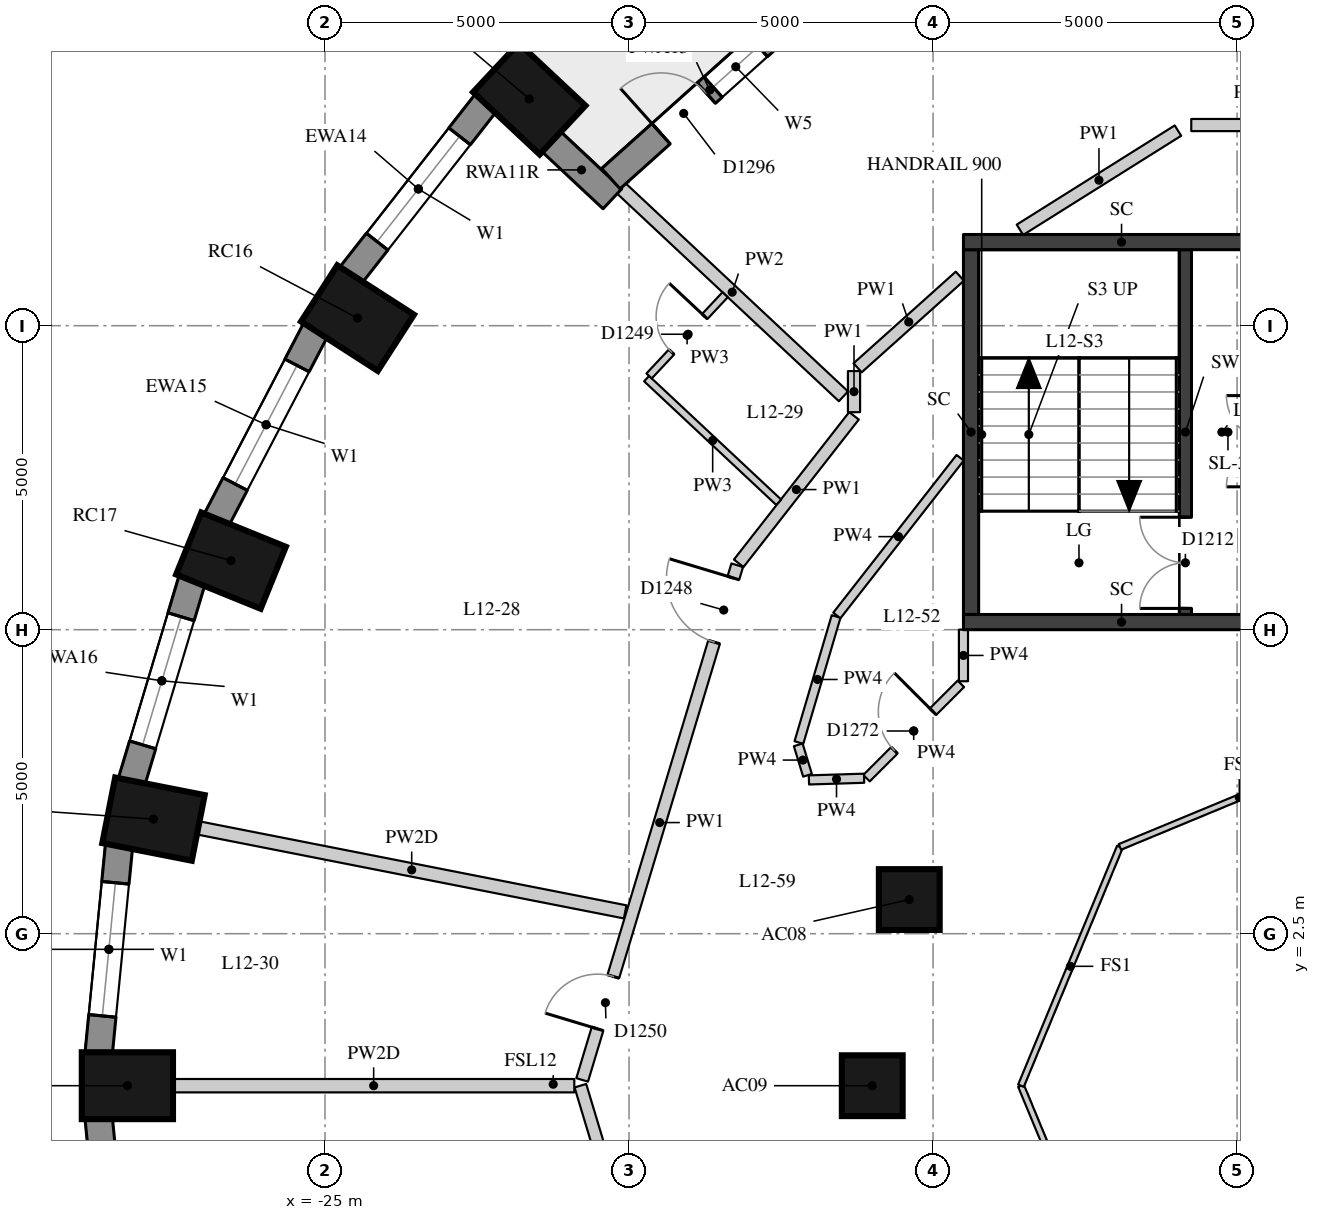
"""IFC4 building model, lengths in metres.
Left out: names, types, materials, properties, quantities, classifications, styles, units other than length and angle.
Written with IfcOpenShell. Run it as: python <this file> out.ifc"""

import sys

from ifc_helpers import new_model, si_unit, direction, frame, frame_2d, origin, origin_2d, place, context, subcontext, project, spatial, rectangle, extrude, element, fill, save


model = new_model("IFC4")
c1 = context("Model", 3, precision=1e-05, world=origin(), true_north=direction((0.0, 1.0)))
c2 = subcontext(c1, "Body", "Model", "MODEL_VIEW")
j1 = project(units=[si_unit("LENGTHUNIT", "METRE"), si_unit("PLANEANGLEUNIT", "RADIAN")], contexts=[c1])
p1 = place(None, origin())
s1 = spatial("IfcSite", under=j1, at=p1, CompositionType="ELEMENT")
p2 = place(p1, origin())
s2 = spatial("IfcBuilding", under=s1, at=p2, CompositionType="ELEMENT")
p3 = place(p2, frame((0.0, 0.0, 48.1)))
s3 = spatial("IfcBuildingStorey", under=s2, at=p3, CompositionType="ELEMENT", Elevation=48.1)
for number, where, z_axis, x_axis in (
    (1, (-21.641, 16.23, 0.0), (0.0, 0.0, 1.0), (-0.73, 0.683, 0.0)),
    (2, (-24.465, 12.625, 0.0), (0.0, 0.0, 1.0), (-0.841, 0.541, 0.0)),
    (3, (-26.546, 8.636, 0.0), (0.0, 0.0, 1.0), (-0.927, 0.376, 0.0)),
    (4, (-27.821, 4.385, 0.0), (0.0, 0.0, 1.0), (-0.981, 0.193, 0.0)),
    (5, (-28.25, 0.0, 0.0), (0.0, 0.0, 1.0), (-1.0, 0.0, 0.0)),
):
    element("IfcColumn", number, at=place(p3, frame(where, z_axis=z_axis, x_axis=x_axis)), inside=s3, PredefinedType="COLUMN", context=c2, shape_type="SweptSolid", body=[
        extrude(rectangle(XDim=1.5, YDim=1.1, at=origin_2d()), origin(), (0.0, 0.0, 1.0), 3.3),
    ])
for number, where, z_axis, x_axis in (
    (6, (-15.391, 3.062, 0.0), (0.0, 0.0, 1.0), (1.0, 0.0, 0.0)),
    (7, (-16.0, 0.0, 0.0), (0.0, 0.0, 1.0), (1.0, 0.0, 0.0)),
):
    element("IfcColumn", number, at=place(p3, frame(where, z_axis=z_axis, x_axis=x_axis)), inside=s3, PredefinedType="COLUMN", context=c2, shape_type="SweptSolid", body=[
        extrude(rectangle(XDim=1.0, YDim=1.0, at=origin_2d()), origin(), (0.0, 0.0, 1.0), 3.3),
    ])
p4 = place(p3, frame((-22.352, 16.17, 0.0), z_axis=(0.0, 0.0, 1.0), x_axis=(-0.616661975264, -0.787228053529, 0.0)))
e8 = element("IfcWall", 8, at=p4, inside=s3, PredefinedType="SOLIDWALL", context=c2, shape_type="SweptSolid", body=[
    extrude(rectangle(XDim=3.61, YDim=0.45, at=frame_2d((1.805, 0.0))), origin(), (0.0, 0.0, 1.0), 3.02),
])
p5 = place(p4, frame((0.705, 0.0, 0.4)))
e9 = element("IfcOpeningElement", 9, at=p5, cuts=e8, PredefinedType="OPENING", context=c2, shape_type="SweptSolid", body=[
    extrude(rectangle(XDim=2.2, YDim=1.75, at=frame_2d((1.1, 0.875))), frame((0.0, 0.235, 0.0), z_axis=(0.0, -1.0, 0.0), x_axis=(1.0, 0.0, 0.0)), (0.0, 0.0, 1.0), 0.47),
])
p6 = place(p3, frame((-25.152, 12.437, 0.0), z_axis=(0.0, 0.0, 1.0), x_axis=(-0.462492775226, -0.886623050041, 0.0)))
e10 = element("IfcWall", 10, at=p6, inside=s3, PredefinedType="SOLIDWALL", context=c2, shape_type="SweptSolid", body=[
    extrude(rectangle(XDim=3.532, YDim=0.45, at=frame_2d((1.766, 0.0))), origin(), (0.0, 0.0, 1.0), 3.02),
])
p7 = place(p6, frame((0.666, 0.0, 0.4)))
e11 = element("IfcOpeningElement", 11, at=p7, cuts=e10, PredefinedType="OPENING", context=c2, shape_type="SweptSolid", body=[
    extrude(rectangle(XDim=2.2, YDim=1.75, at=frame_2d((1.1, 0.875))), frame((0.0, 0.235, 0.0), z_axis=(0.0, -1.0, 0.0), x_axis=(1.0, 0.0, 0.0)), (0.0, 0.0, 1.0), 0.47),
])
p8 = place(p3, frame((-27.185, 8.323, 0.0), z_axis=(0.0, 0.0, 1.0), x_axis=(-0.287064133733, -0.957911364963, 0.0)))
e12 = element("IfcWall", 12, at=p8, inside=s3, PredefinedType="SOLIDWALL", context=c2, shape_type="SweptSolid", body=[
    extrude(rectangle(XDim=3.473, YDim=0.45, at=frame_2d((1.737, 0.0))), origin(), (0.0, 0.0, 1.0), 3.02),
])
p9 = place(p8, frame((0.637, 0.0, 0.4)))
e13 = element("IfcOpeningElement", 13, at=p9, cuts=e12, PredefinedType="OPENING", context=c2, shape_type="SweptSolid", body=[
    extrude(rectangle(XDim=2.2, YDim=1.75, at=frame_2d((1.1, 0.875))), frame((0.0, 0.235, 0.0), z_axis=(0.0, -1.0, 0.0), x_axis=(1.0, 0.0, 0.0)), (0.0, 0.0, 1.0), 0.47),
])
p10 = place(p3, frame((-28.387, 3.956, 0.0), z_axis=(0.0, 0.0, 1.0), x_axis=(-0.097389581596, -0.995246336038, 0.0)))
e14 = element("IfcWall", 14, at=p10, inside=s3, PredefinedType="SOLIDWALL", context=c2, shape_type="SweptSolid", body=[
    extrude(rectangle(XDim=3.442, YDim=0.45, at=frame_2d((1.721, 0.0))), origin(), (0.0, 0.0, 1.0), 3.02),
])
p11 = place(p10, frame((0.621, 0.0, 0.4)))
e15 = element("IfcOpeningElement", 15, at=p11, cuts=e14, PredefinedType="OPENING", context=c2, shape_type="SweptSolid", body=[
    extrude(rectangle(XDim=2.2, YDim=1.75, at=frame_2d((1.1, 0.875))), frame((0.0, 0.235, 0.0), z_axis=(0.0, -1.0, 0.0), x_axis=(1.0, 0.0, 0.0)), (0.0, 0.0, 1.0), 0.47),
])
p12 = place(p3, frame((-28.722, -0.53, 0.0), z_axis=(0.0, 0.0, 1.0), x_axis=(0.097389581596, -0.995246336038, 0.0)))
e16 = element("IfcWall", 16, at=p12, inside=s3, PredefinedType="SOLIDWALL", context=c2, shape_type="SweptSolid", body=[
    extrude(rectangle(XDim=3.442, YDim=0.45, at=frame_2d((1.721, 0.0))), origin(), (0.0, 0.0, 1.0), 3.02),
])
p13 = place(p12, frame((0.621, 0.0, 0.4)))
e17 = element("IfcOpeningElement", 17, at=p13, cuts=e16, PredefinedType="OPENING", context=c2, shape_type="SweptSolid", body=[
    extrude(rectangle(XDim=2.2, YDim=1.75, at=frame_2d((1.1, 0.875))), frame((0.0, 0.235, 0.0), z_axis=(0.0, -1.0, 0.0), x_axis=(1.0, 0.0, 0.0)), (0.0, 0.0, 1.0), 0.47),
])
p14 = place(p3, frame((-21.289, 15.538, 0.0), z_axis=(0.0, 0.0, 1.0), x_axis=(0.730149942784, -0.683286953668, 0.0)))
e18 = element("IfcWall", 18, at=p14, inside=s3, PredefinedType="SOLIDWALL", context=c2, shape_type="SweptSolid", body=[
    extrude(rectangle(XDim=1.391, YDim=0.45, at=frame_2d((0.695, 0.0))), origin(), (0.0, 0.0, 1.0), 3.02),
])
p15 = place(p3, frame((-17.048, 17.832, 0.0), z_axis=(0.0, 0.0, 1.0), x_axis=(-0.744619286768, -0.667489413978, 0.0)))
e19 = element("IfcWall", 19, at=p15, inside=s3, PredefinedType="SOLIDWALL", context=c2, shape_type="SweptSolid", body=[
    extrude(rectangle(XDim=4.365, YDim=0.45, at=frame_2d((2.183, 0.0))), origin(), (0.0, 0.0, 1.0), 3.02),
])
p16 = place(p15, frame((1.107, 0.0, 0.4)))
e20 = element("IfcOpeningElement", 20, at=p16, cuts=e19, PredefinedType="OPENING", context=c2, shape_type="SweptSolid", body=[
    extrude(rectangle(XDim=1.0, YDim=1.75, at=frame_2d((0.5, 0.875))), frame((0.0, 0.235, 0.0), z_axis=(0.0, -1.0, 0.0), x_axis=(1.0, 0.0, 0.0)), (0.0, 0.0, 1.0), 0.47),
])
p17 = place(p15, frame((2.258, 0.0, 0.0)))
e21 = element("IfcOpeningElement", 21, at=p17, cuts=e19, PredefinedType="OPENING", context=c2, shape_type="SweptSolid", body=[
    extrude(rectangle(XDim=1.0, YDim=2.15, at=frame_2d((0.5, 1.075))), frame((0.0, 0.235, 0.0), z_axis=(0.0, -1.0, 0.0), x_axis=(1.0, 0.0, 0.0)), (0.0, 0.0, 1.0), 0.47),
])
p18 = place(p3, frame((-10.85, 7.75, 0.0), z_axis=(0.0, 0.0, 1.0), x_axis=(0.0, 1.0, 0.0)))
e22 = element("IfcWall", 22, at=p18, inside=s3, PredefinedType="SHEAR", context=c2, shape_type="SweptSolid", body=[
    extrude(rectangle(XDim=6.0, YDim=0.2, at=frame_2d((3.0, 0.0))), origin(), (0.0, 0.0, 1.0), 3.02),
])
p19 = place(p18, frame((0.1, 0.0, 0.0)))
e23 = element("IfcOpeningElement", 23, at=p19, cuts=e22, PredefinedType="OPENING", context=c2, shape_type="SweptSolid", body=[
    extrude(rectangle(XDim=1.5, YDim=2.1, at=frame_2d((0.75, 1.05))), frame((0.0, 0.11, 0.0), z_axis=(0.0, -1.0, 0.0), x_axis=(1.0, 0.0, 0.0)), (0.0, 0.0, 1.0), 0.22),
])
p20 = place(p3, frame((-14.375, 7.75, -0.28), z_axis=(0.0, 0.0, 1.0), x_axis=(0.0, 1.0, 0.0)))
e24 = element("IfcWall", 24, at=p20, inside=s3, PredefinedType="SHEAR", context=c2, shape_type="SweptSolid", body=[
    extrude(rectangle(XDim=6.0, YDim=0.25, at=frame_2d((3.0, 0.0))), origin(), (0.0, 0.0, 1.0), 3.3),
])
for number, where, z_axis, x_axis in (
    (25, (-14.5, 13.875, -0.28), (0.0, 0.0, 1.0), (1.0, 0.0, 0.0)),
    (26, (-14.5, 7.625, -0.28), (0.0, 0.0, 1.0), (1.0, 0.0, 0.0)),
):
    element("IfcWall", number, at=place(p3, frame(where, z_axis=z_axis, x_axis=x_axis)), inside=s3, PredefinedType="SHEAR", context=c2, shape_type="SweptSolid", body=[
        extrude(rectangle(XDim=5.2, YDim=0.25, at=frame_2d((2.6, 0.0))), origin(), (0.0, 0.0, 1.0), 3.3),
    ])
p21 = place(p3, frame((-18.232, -8.522, 0.0), z_axis=(0.0, 0.0, 1.0), x_axis=(-0.288502732396, 0.957479072043, 0.0)))
e27 = element("IfcWall", 27, at=p21, inside=s3, PredefinedType="PARTITIONING", context=c2, shape_type="SweptSolid", body=[
    extrude(rectangle(XDim=8.901, YDim=0.2, at=frame_2d((4.45, 0.0))), origin(), (0.0, 0.0, 1.0), 3.02),
])
p22 = place(p21, frame((6.965, 0.0, 0.0)))
e28 = element("IfcOpeningElement", 28, at=p22, cuts=e27, PredefinedType="OPENING", context=c2, shape_type="SweptSolid", body=[
    extrude(rectangle(XDim=0.9, YDim=2.1, at=frame_2d((0.45, 1.05))), frame((0.0, 0.11, 0.0), z_axis=(0.0, -1.0, 0.0), x_axis=(1.0, 0.0, 0.0)), (0.0, 0.0, 1.0), 0.22),
])
p23 = place(p21, frame((2.465, 0.0, 0.0)))
e29 = element("IfcOpeningElement", 29, at=p23, cuts=e27, PredefinedType="OPENING", context=c2, shape_type="SweptSolid", body=[
    extrude(rectangle(XDim=1.1, YDim=2.1, at=frame_2d((0.55, 1.05))), frame((0.0, 0.11, 0.0), z_axis=(0.0, -1.0, 0.0), x_axis=(1.0, 0.0, 0.0)), (0.0, 0.0, 1.0), 0.22),
])
p24 = place(p3, frame((-20.771, 0.095, 0.0), z_axis=(0.0, 0.0, 1.0), x_axis=(0.288464952331, 0.957490454927, 0.0)))
e30 = element("IfcWall", 30, at=p24, inside=s3, PredefinedType="PARTITIONING", context=c2, shape_type="SweptSolid", body=[
    extrude(rectangle(XDim=8.841, YDim=0.2, at=frame_2d((4.42, 0.0))), origin(), (0.0, 0.0, 1.0), 3.02),
])
p25 = place(p24, frame((7.521, 0.0, 0.0)))
e31 = element("IfcOpeningElement", 31, at=p25, cuts=e30, PredefinedType="OPENING", context=c2, shape_type="SweptSolid", body=[
    extrude(rectangle(XDim=1.1, YDim=2.1, at=frame_2d((0.55, 1.05))), frame((0.0, 0.11, 0.0), z_axis=(0.0, -1.0, 0.0), x_axis=(1.0, 0.0, 0.0)), (0.0, 0.0, 1.0), 0.22),
])
p26 = place(p24, frame((0.877, 0.0, 0.0)))
e32 = element("IfcOpeningElement", 32, at=p26, cuts=e30, PredefinedType="OPENING", context=c2, shape_type="SweptSolid", body=[
    extrude(rectangle(XDim=0.9, YDim=2.1, at=frame_2d((0.45, 1.05))), frame((0.0, 0.11, 0.0), z_axis=(0.0, -1.0, 0.0), x_axis=(1.0, 0.0, 0.0)), (0.0, 0.0, 1.0), 0.22),
])
p27 = place(p3, frame((-18.196, 8.592, 0.0), z_axis=(0.0, 0.0, 1.0), x_axis=(0.615854849191, 0.787859635168, 0.0)))
e33 = element("IfcWall", 33, at=p27, inside=s3, PredefinedType="PARTITIONING", context=c2, shape_type="SweptSolid", body=[
    extrude(rectangle(XDim=3.079, YDim=0.2, at=frame_2d((1.539, 0.0))), origin(), (0.0, 0.0, 1.0), 3.02),
])
p28 = place(p3, frame((-16.3, 11.078, 0.0), z_axis=(0.0, 0.0, 1.0), x_axis=(0.0, 1.0, 0.0)))
e34 = element("IfcWall", 34, at=p28, inside=s3, PredefinedType="PARTITIONING", context=c2, shape_type="SweptSolid", body=[
    extrude(rectangle(XDim=0.676, YDim=0.2, at=frame_2d((0.338, 0.0))), origin(), (0.0, 0.0, 1.0), 3.02),
])
p29 = place(p3, frame((-16.24, 11.807, 0.0), z_axis=(0.0, 0.0, 1.0), x_axis=(0.744658399013, 0.667445779655, 0.0)))
e35 = element("IfcWall", 35, at=p29, inside=s3, PredefinedType="PARTITIONING", context=c2, shape_type="SweptSolid", body=[
    extrude(rectangle(XDim=2.258, YDim=0.2, at=frame_2d((1.129, 0.0))), origin(), (0.0, 0.0, 1.0), 3.02),
])
p30 = place(p3, frame((-13.571, 14.077, 0.0), z_axis=(0.0, 0.0, 1.0), x_axis=(0.846954991261, 0.53166459613, 0.0)))
e36 = element("IfcWall", 36, at=p30, inside=s3, PredefinedType="PARTITIONING", context=c2, shape_type="SweptSolid", body=[
    extrude(rectangle(XDim=3.068, YDim=0.2, at=frame_2d((1.534, 0.0))), origin(), (0.0, 0.0, 1.0), 3.02),
])
p31 = place(p3, frame((-10.753, 15.8, 0.0), z_axis=(0.0, 0.0, 1.0), x_axis=(1.0, 0.0, 0.0)))
e37 = element("IfcWall", 37, at=p31, inside=s3, PredefinedType="PARTITIONING", context=c2, shape_type="SweptSolid", body=[
    extrude(rectangle(XDim=2.039, YDim=0.2, at=frame_2d((1.019, 0.0))), origin(), (0.0, 0.0, 1.0), 3.02),
])
p32 = place(p3, frame((-14.5, 7.501, 0.0), z_axis=(0.0, 0.0, 1.0), x_axis=(0.0, -1.0, 0.0)))
e38 = element("IfcWall", 38, at=p32, inside=s3, PredefinedType="PARTITIONING", context=c2, shape_type="SweptSolid", body=[
    extrude(rectangle(XDim=0.849, YDim=0.15, at=frame_2d((0.424, 0.0))), origin(), (0.0, 0.0, 1.0), 3.02),
])
p33 = place(p3, frame((-14.542, 6.61, 0.0), z_axis=(0.0, 0.0, 1.0), x_axis=(-0.707106781187, -0.707106781187, 0.0)))
e39 = element("IfcWall", 39, at=p33, inside=s3, PredefinedType="PARTITIONING", context=c2, shape_type="SweptSolid", body=[
    extrude(rectangle(XDim=2.195, YDim=0.15, at=frame_2d((1.097, 0.0))), origin(), (0.0, 0.0, 1.0), 3.02),
])
p34 = place(p33, frame((0.647, 0.0, 0.0)))
e40 = element("IfcOpeningElement", 40, at=p34, cuts=e39, PredefinedType="OPENING", context=c2, shape_type="SweptSolid", body=[
    extrude(rectangle(XDim=0.9, YDim=2.1, at=frame_2d((0.45, 1.05))), frame((0.0, 0.085, 0.0), z_axis=(0.0, -1.0, 0.0), x_axis=(1.0, 0.0, 0.0)), (0.0, 0.0, 1.0), 0.17),
])
p35 = place(p3, frame((-16.134, 5.057, 0.0), z_axis=(0.0, 0.0, 1.0), x_axis=(-0.999529504487, -0.030671968644, 0.0)))
e41 = element("IfcWall", 41, at=p35, inside=s3, PredefinedType="PARTITIONING", context=c2, shape_type="SweptSolid", body=[
    extrude(rectangle(XDim=0.907, YDim=0.15, at=frame_2d((0.454, 0.0))), origin(), (0.0, 0.0, 1.0), 3.02),
])
p36 = place(p3, frame((-17.065, 5.105, 0.0), z_axis=(0.0, 0.0, 1.0), x_axis=(-0.291495658108, 0.956572151646, 0.0)))
e42 = element("IfcWall", 42, at=p36, inside=s3, PredefinedType="PARTITIONING", context=c2, shape_type="SweptSolid", body=[
    extrude(rectangle(XDim=0.523, YDim=0.15, at=frame_2d((0.262, 0.0))), origin(), (0.0, 0.0, 1.0), 3.02),
])
p37 = place(p3, frame((-17.206, 5.645, 0.0), z_axis=(0.0, 0.0, 1.0), x_axis=(0.282930600638, 0.95914038348, 0.0)))
e43 = element("IfcWall", 43, at=p37, inside=s3, PredefinedType="PARTITIONING", context=c2, shape_type="SweptSolid", body=[
    extrude(rectangle(XDim=2.162, YDim=0.15, at=frame_2d((1.081, 0.0))), origin(), (0.0, 0.0, 1.0), 3.02),
])
p38 = place(p3, frame((-16.582, 7.734, 0.0), z_axis=(0.0, 0.0, 1.0), x_axis=(0.615848335932, 0.787864726416, 0.0)))
e44 = element("IfcWall", 44, at=p38, inside=s3, PredefinedType="PARTITIONING", context=c2, shape_type="SweptSolid", body=[
    extrude(rectangle(XDim=3.293, YDim=0.15, at=frame_2d((1.646, 0.0))), origin(), (0.0, 0.0, 1.0), 3.02),
])
p39 = place(p3, frame((-20.133, 14.764, 0.0), z_axis=(0.0, 0.0, 1.0), x_axis=(0.73007309337, -0.683369064516, 0.0)))
e45 = element("IfcWall", 45, at=p39, inside=s3, PredefinedType="PARTITIONING", context=c2, shape_type="SweptSolid", body=[
    extrude(rectangle(XDim=5.013, YDim=0.22, at=frame_2d((2.507, 0.0))), origin(), (0.0, 0.0, 1.0), 3.02),
])
p40 = place(p3, frame((-27.085, 4.24, 0.0), z_axis=(0.0, 0.0, 1.0), x_axis=(0.981197740145, -0.193005167635, 0.0)))
e46 = element("IfcWall", 46, at=p40, inside=s3, PredefinedType="PARTITIONING", context=c2, shape_type="SweptSolid", body=[
    extrude(rectangle(XDim=7.156, YDim=0.22, at=frame_2d((3.578, 0.0))), origin(), (0.0, 0.0, 1.0), 2.47),
])
p41 = place(p3, frame((-27.5, 0.0, 0.0), z_axis=(0.0, 0.0, 1.0), x_axis=(1.0, 0.0, 0.0)))
e47 = element("IfcWall", 47, at=p41, inside=s3, PredefinedType="PARTITIONING", context=c2, shape_type="SweptSolid", body=[
    extrude(rectangle(XDim=6.6, YDim=0.22, at=frame_2d((3.3, 0.0))), origin(), (0.0, 0.0, 1.0), 2.47),
])
p42 = place(p3, frame((-17.538, 9.596, 0.0), z_axis=(0.0, 0.0, 1.0), x_axis=(-0.730099766179, 0.683340567671, 0.0)))
e48 = element("IfcWall", 48, at=p42, inside=s3, PredefinedType="PARTITIONING", context=c2, shape_type="SweptSolid", body=[
    extrude(rectangle(XDim=2.976, YDim=0.12, at=frame_2d((1.488, 0.0))), origin(), (0.0, 0.0, 1.0), 3.02),
])
p43 = place(p3, frame((-19.67, 11.673, 0.0), z_axis=(0.0, 0.0, 1.0), x_axis=(0.683372850006, 0.730069550026, 0.0)))
e49 = element("IfcWall", 49, at=p43, inside=s3, PredefinedType="PARTITIONING", context=c2, shape_type="SweptSolid", body=[
    extrude(rectangle(XDim=1.83, YDim=0.12, at=frame_2d((0.915, 0.0))), origin(), (0.0, 0.0, 1.0), 3.02),
])
p44 = place(p43, frame((0.54, 0.0, 0.0)))
e50 = element("IfcOpeningElement", 50, at=p44, cuts=e49, PredefinedType="OPENING", context=c2, shape_type="SweptSolid", body=[
    extrude(rectangle(XDim=0.8, YDim=2.1, at=frame_2d((0.4, 1.05))), frame((0.0, 0.07, 0.0), z_axis=(0.0, -1.0, 0.0), x_axis=(1.0, 0.0, 0.0)), (0.0, 0.0, 1.0), 0.14),
])
for number, where, z_axis, x_axis in (
    (51, (-11.927, -3.927, 0.0), (0.0, 0.0, 1.0), (-0.383, 0.924, 0.0)),
    (52, (-13.554, 0.0, 0.0), (0.0, 0.0, 1.0), (0.383, 0.924, 0.0)),
    (53, (-11.927, 3.927, 0.0), (0.0, 0.0, 1.0), (0.924, 0.383, 0.0)),
):
    element("IfcWall", number, at=place(p3, frame(where, z_axis=z_axis, x_axis=x_axis)), inside=s3, PredefinedType="PARTITIONING", context=c2, shape_type="SweptSolid", body=[
        extrude(rectangle(XDim=4.251, YDim=0.1, at=frame_2d((2.125, 0.0))), origin(), (0.0, 0.0, 1.0), 3.02),
    ])
p45 = place(p5, origin())
e54 = element("IfcWindow", 54, at=p45, inside=s3, PartitioningType="SINGLE_PANEL", PredefinedType="WINDOW", context=c2, shape_type="SweptSolid", body=[
    extrude(rectangle(XDim=2.2, YDim=1.75, at=frame_2d((1.1, 0.875))), frame((0.0, 0.035, 0.0), z_axis=(0.0, -1.0, 0.0), x_axis=(1.0, 0.0, 0.0)), (0.0, 0.0, 1.0), 0.06),
])
fill(e9, e54)
p46 = place(p7, origin())
e55 = element("IfcWindow", 55, at=p46, inside=s3, PartitioningType="SINGLE_PANEL", PredefinedType="WINDOW", context=c2, shape_type="SweptSolid", body=[
    extrude(rectangle(XDim=2.2, YDim=1.75, at=frame_2d((1.1, 0.875))), frame((0.0, 0.035, 0.0), z_axis=(0.0, -1.0, 0.0), x_axis=(1.0, 0.0, 0.0)), (0.0, 0.0, 1.0), 0.06),
])
fill(e11, e55)
p47 = place(p9, origin())
e56 = element("IfcWindow", 56, at=p47, inside=s3, PartitioningType="SINGLE_PANEL", PredefinedType="WINDOW", context=c2, shape_type="SweptSolid", body=[
    extrude(rectangle(XDim=2.2, YDim=1.75, at=frame_2d((1.1, 0.875))), frame((0.0, 0.035, 0.0), z_axis=(0.0, -1.0, 0.0), x_axis=(1.0, 0.0, 0.0)), (0.0, 0.0, 1.0), 0.06),
])
fill(e13, e56)
p48 = place(p11, origin())
e57 = element("IfcWindow", 57, at=p48, inside=s3, PartitioningType="SINGLE_PANEL", PredefinedType="WINDOW", context=c2, shape_type="SweptSolid", body=[
    extrude(rectangle(XDim=2.2, YDim=1.75, at=frame_2d((1.1, 0.875))), frame((0.0, 0.035, 0.0), z_axis=(0.0, -1.0, 0.0), x_axis=(1.0, 0.0, 0.0)), (0.0, 0.0, 1.0), 0.06),
])
fill(e15, e57)
p49 = place(p16, origin())
e58 = element("IfcWindow", 58, at=p49, inside=s3, PartitioningType="SINGLE_PANEL", PredefinedType="WINDOW", context=c2, shape_type="SweptSolid", body=[
    extrude(rectangle(XDim=1.0, YDim=1.75, at=frame_2d((0.5, 0.875))), frame((0.0, 0.035, 0.0), z_axis=(0.0, -1.0, 0.0), x_axis=(1.0, 0.0, 0.0)), (0.0, 0.0, 1.0), 0.06),
])
fill(e20, e58)
p50 = place(p17, frame((1.0, 0.0, 0.0), z_axis=(0.0, 0.0, 1.0), x_axis=(-1.0, 0.0, 0.0)))
e59 = element("IfcDoor", 59, at=p50, inside=s3, OperationType="SINGLE_SWING_LEFT", PredefinedType="DOOR", context=c2, shape_type="SweptSolid", body=[
    extrude(rectangle(XDim=1.0, YDim=2.15, at=frame_2d((0.5, 1.075))), frame((0.0, 0.075, 0.0), z_axis=(0.0, -1.0, 0.0), x_axis=(1.0, 0.0, 0.0)), (0.0, 0.0, 1.0), 0.05),
])
fill(e21, e59)
p51 = place(p19, origin())
e60 = element("IfcDoor", 60, at=p51, inside=s3, OperationType="DOUBLE_DOOR_SINGLE_SWING", PredefinedType="DOOR", context=c2, shape_type="SweptSolid", body=[
    extrude(rectangle(XDim=1.5, YDim=2.1, at=frame_2d((0.75, 1.05))), frame((0.0, 0.025, 0.0), z_axis=(0.0, -1.0, 0.0), x_axis=(1.0, 0.0, 0.0)), (0.0, 0.0, 1.0), 0.05),
])
fill(e23, e60)
p52 = place(p25, origin())
e61 = element("IfcDoor", 61, at=p52, inside=s3, OperationType="SINGLE_SWING_RIGHT", PredefinedType="DOOR", context=c2, shape_type="SweptSolid", body=[
    extrude(rectangle(XDim=1.1, YDim=2.1, at=frame_2d((0.55, 1.05))), frame((0.0, 0.025, 0.0), z_axis=(0.0, -1.0, 0.0), x_axis=(1.0, 0.0, 0.0)), (0.0, 0.0, 1.0), 0.05),
])
fill(e31, e61)
p53 = place(p44, origin())
e62 = element("IfcDoor", 62, at=p53, inside=s3, OperationType="SINGLE_SWING_RIGHT", PredefinedType="DOOR", context=c2, shape_type="SweptSolid", body=[
    extrude(rectangle(XDim=0.8, YDim=2.1, at=frame_2d((0.4, 1.05))), frame((0.0, 0.025, 0.0), z_axis=(0.0, -1.0, 0.0), x_axis=(1.0, 0.0, 0.0)), (0.0, 0.0, 1.0), 0.05),
])
fill(e50, e62)
p54 = place(p26, origin())
e63 = element("IfcDoor", 63, at=p54, inside=s3, OperationType="SINGLE_SWING_LEFT", PredefinedType="DOOR", context=c2, shape_type="SweptSolid", body=[
    extrude(rectangle(XDim=0.9, YDim=2.1, at=frame_2d((0.45, 1.05))), frame((0.0, 0.025, 0.0), z_axis=(0.0, -1.0, 0.0), x_axis=(1.0, 0.0, 0.0)), (0.0, 0.0, 1.0), 0.05),
])
fill(e32, e63)
p55 = place(p34, origin())
e64 = element("IfcDoor", 64, at=p55, inside=s3, OperationType="SINGLE_SWING_RIGHT", PredefinedType="DOOR", context=c2, shape_type="SweptSolid", body=[
    extrude(rectangle(XDim=0.9, YDim=2.1, at=frame_2d((0.45, 1.05))), frame((0.0, 0.025, 0.0), z_axis=(0.0, -1.0, 0.0), x_axis=(1.0, 0.0, 0.0)), (0.0, 0.0, 1.0), 0.05),
])
fill(e40, e64)
save(model, sys.argv[1])
